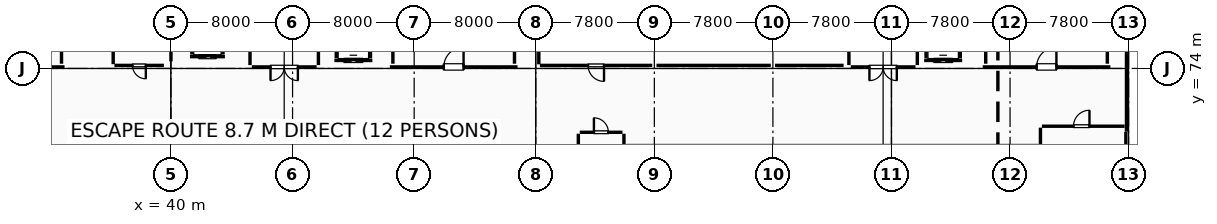
"""IFC4 building model, lengths in metres.
Left out: names, types, materials, properties, quantities, classifications, styles, units other than length and angle.
Written with IfcOpenShell. Run it as: python <this file> out.ifc"""

import sys

from ifc_helpers import new_model, si_unit, direction, frame, frame_2d, origin, origin_2d, place, context, subcontext, project, spatial, rectangle, i_section, extrude, element, fill, save


model = new_model("IFC4")
c1 = context("Model", 3, precision=1e-05, world=origin(), true_north=direction((0.0, 1.0)))
c2 = subcontext(c1, "Body", "Model", "MODEL_VIEW")
j1 = project(units=[si_unit("LENGTHUNIT", "METRE"), si_unit("PLANEANGLEUNIT", "RADIAN")], contexts=[c1])
p1 = place(None, origin())
s1 = spatial("IfcSite", under=j1, at=p1, CompositionType="ELEMENT")
p2 = place(p1, origin())
s2 = spatial("IfcBuilding", under=s1, at=p2, CompositionType="ELEMENT")
p3 = place(p2, frame((0.0, 0.0, 19.8)))
s3 = spatial("IfcBuildingStorey", under=s2, at=p3, CompositionType="ELEMENT", Elevation=19.8)
p4 = place(p3, frame((40.0, 74.0, 0.0), z_axis=(0.0, 0.0, 1.0), x_axis=(1.0, 0.0, 0.0)))
e1 = element("IfcColumn", 1, at=p4, inside=s3, PredefinedType="COLUMN", context=c2, shape_type="SweptSolid", body=[
    extrude(rectangle(XDim=0.9, YDim=0.9, at=origin_2d()), origin(), (0.0, 0.0, 1.0), 4.46),
])
for number, where, z_axis, x_axis in (
    (2, (64.0, 74.0, 0.0), (0.0, 0.0, 1.0), (1.0, 0.0, 0.0)),
    (3, (71.8, 74.0, 0.0), (0.0, 0.0, 1.0), (1.0, 0.0, 0.0)),
    (4, (79.6, 74.0, 0.0), (0.0, 0.0, 1.0), (1.0, 0.0, 0.0)),
    (5, (103.0, 74.0, 0.0), (0.0, 0.0, 1.0), (1.0, 0.0, 0.0)),
):
    element("IfcColumn", number, at=place(p3, frame(where, z_axis=z_axis, x_axis=x_axis)), inside=s3, PredefinedType="COLUMN", context=c2, shape_type="SweptSolid", body=[
        extrude(i_section(OverallWidth=0.25, OverallDepth=0.45, WebThickness=0.011, FlangeThickness=0.014, FilletRadius=0.015, at=origin_2d()), origin(), (0.0, 0.0, 1.0), 4.5),
    ])
p5 = place(p3, frame((102.86, 82.767, 0.0), z_axis=(0.0, 0.0, 1.0), x_axis=(0.0, -1.0, 0.0)))
e6 = element("IfcWall", 6, at=p5, inside=s3, PredefinedType="ELEMENTEDWALL", context=c2, shape_type="SweptSolid", body=[
    extrude(rectangle(XDim=9.0, YDim=0.24, at=frame_2d((4.5, 0.0))), origin(), (0.0, 0.0, 1.0), 3.385),
])
p6 = place(p3, frame((102.86, 73.767, 0.0), z_axis=(0.0, 0.0, 1.0), x_axis=(0.0, -1.0, 0.0)))
e7 = element("IfcWall", 7, at=p6, inside=s3, PredefinedType="ELEMENTEDWALL", context=c2, shape_type="SweptSolid", body=[
    extrude(rectangle(XDim=3.933, YDim=0.24, at=frame_2d((1.967, 0.0))), origin(), (0.0, 0.0, 1.0), 3.235),
])
p7 = place(p3, frame((102.82, 69.83, 0.0), z_axis=(0.0, 0.0, 1.0), x_axis=(0.0, -1.0, 0.0)))
e8 = element("IfcWall", 8, at=p7, inside=s3, PredefinedType="STANDARD", context=c2, shape_type="SweptSolid", body=[
    extrude(rectangle(XDim=5.063, YDim=0.32, at=frame_2d((2.531, 0.0))), origin(), (0.0, 0.0, 1.0), 3.235),
])
p8 = place(p3, frame((39.76, 69.88, 0.0), z_axis=(0.0, 0.0, 1.0), x_axis=(0.0, -1.0, 0.0)))
e9 = element("IfcWall", 9, at=p8, inside=s3, PredefinedType="PARAPET", context=c2, shape_type="SweptSolid", body=[
    extrude(rectangle(XDim=4.42, YDim=0.18, at=frame_2d((2.21, 0.0))), origin(), (0.0, 0.0, 1.0), 0.88),
])
p9 = place(p3, frame((54.4, 74.1, 0.0), z_axis=(0.0, 0.0, 1.0), x_axis=(1.0, 0.0, 0.0)))
e10 = element("IfcWall", 10, at=p9, inside=s3, PredefinedType="SHEAR", context=c2, shape_type="SweptSolid", body=[
    extrude(rectangle(XDim=8.4, YDim=0.4, at=frame_2d((4.2, 0.0))), origin(), (0.0, 0.0, 1.0), 4.25),
])
p10 = place(p9, frame((3.55, 0.0, 0.0)))
e11 = element("IfcOpeningElement", 11, at=p10, cuts=e10, PredefinedType="OPENING", context=c2, shape_type="SweptSolid", body=[
    extrude(rectangle(XDim=1.3, YDim=2.15, at=frame_2d((0.65, 1.075))), frame((0.0, 0.21, 0.0), z_axis=(0.0, -1.0, 0.0), x_axis=(1.0, 0.0, 0.0)), (0.0, 0.0, 1.0), 0.42),
])
for number, where, z_axis, x_axis in (
    (12, (62.6, 74.31, 0.0), (0.0, 0.0, 1.0), (0.0, 1.0, 0.0)),
    (13, (54.6, 82.69, 0.0), (0.0, 0.0, 1.0), (0.0, -1.0, 0.0)),
):
    element("IfcWall", number, at=place(p3, frame(where, z_axis=z_axis, x_axis=x_axis)), inside=s3, PredefinedType="SHEAR", context=c2, shape_type="SweptSolid", body=[
        extrude(rectangle(XDim=8.38, YDim=0.4, at=frame_2d((4.19, 0.0))), origin(), (0.0, 0.0, 1.0), 4.25),
    ])
p11 = place(p3, frame((50.75, 74.525, 0.0), z_axis=(0.0, 0.0, 1.0), x_axis=(1.0, 0.0, 0.0)))
e14 = element("IfcWall", 14, at=p11, inside=s3, PredefinedType="STANDARD", context=c2, shape_type="SweptSolid", body=[
    extrude(rectangle(XDim=2.5, YDim=0.25, at=frame_2d((1.25, 0.0))), origin(), (0.0, 0.0, 1.0), 4.24),
])
p12 = place(p11, frame((0.65, 0.0, 0.0)))
e15 = element("IfcOpeningElement", 15, at=p12, cuts=e14, PredefinedType="OPENING", context=c2, shape_type="SweptSolid", body=[
    extrude(rectangle(XDim=1.2, YDim=2.05, at=frame_2d((0.6, 1.025))), frame((0.0, 0.135, 0.0), z_axis=(0.0, -1.0, 0.0), x_axis=(1.0, 0.0, 0.0)), (0.0, 0.0, 1.0), 0.27),
])
for number, where, z_axis, x_axis in (
    (16, (53.125, 74.66, 0.0), (0.0, 0.0, 1.0), (0.0, 1.0, 0.0)),
    (17, (50.875, 76.94, 0.0), (0.0, 0.0, 1.0), (0.0, -1.0, 0.0)),
):
    element("IfcWall", number, at=place(p3, frame(where, z_axis=z_axis, x_axis=x_axis)), inside=s3, PredefinedType="STANDARD", context=c2, shape_type="SweptSolid", body=[
        extrude(rectangle(XDim=2.28, YDim=0.25, at=frame_2d((1.14, 0.0))), origin(), (0.0, 0.0, 1.0), 4.24),
    ])
p13 = place(p3, frame((41.25, 74.775, 0.0), z_axis=(0.0, 0.0, 1.0), x_axis=(1.0, 0.0, 0.0)))
e18 = element("IfcWall", 18, at=p13, inside=s3, PredefinedType="STANDARD", context=c2, shape_type="SweptSolid", body=[
    extrude(rectangle(XDim=2.3, YDim=0.25, at=frame_2d((1.15, 0.0))), origin(), (0.0, 0.0, 1.0), 4.24),
])
p14 = place(p13, frame((0.6, 0.0, 0.0)))
e19 = element("IfcOpeningElement", 19, at=p14, cuts=e18, PredefinedType="OPENING", context=c2, shape_type="SweptSolid", body=[
    extrude(rectangle(XDim=1.1, YDim=2.15, at=frame_2d((0.55, 1.075))), frame((0.0, 0.135, 0.0), z_axis=(0.0, -1.0, 0.0), x_axis=(1.0, 0.0, 0.0)), (0.0, 0.0, 1.0), 0.27),
])
for number, where, z_axis, x_axis in (
    (20, (43.425, 74.91, 0.0), (0.0, 0.0, 1.0), (0.0, 1.0, 0.0)),
    (21, (41.375, 77.49, 0.0), (0.0, 0.0, 1.0), (0.0, -1.0, 0.0)),
):
    element("IfcWall", number, at=place(p3, frame(where, z_axis=z_axis, x_axis=x_axis)), inside=s3, PredefinedType="STANDARD", context=c2, shape_type="SweptSolid", body=[
        extrude(rectangle(XDim=2.58, YDim=0.25, at=frame_2d((1.29, 0.0))), origin(), (0.0, 0.0, 1.0), 4.24),
    ])
p15 = place(p3, frame((93.4, 74.1, 0.0), z_axis=(0.0, 0.0, 1.0), x_axis=(1.0, 0.0, 0.0)))
e22 = element("IfcWall", 22, at=p15, inside=s3, PredefinedType="SHEAR", context=c2, shape_type="SweptSolid", body=[
    extrude(rectangle(XDim=8.4, YDim=0.4, at=frame_2d((4.2, 0.0))), origin(), (0.0, 0.0, 1.0), 4.25),
])
p16 = place(p15, frame((3.55, 0.0, 0.0)))
e23 = element("IfcOpeningElement", 23, at=p16, cuts=e22, PredefinedType="OPENING", context=c2, shape_type="SweptSolid", body=[
    extrude(rectangle(XDim=1.3, YDim=2.15, at=frame_2d((0.65, 1.075))), frame((0.0, 0.21, 0.0), z_axis=(0.0, -1.0, 0.0), x_axis=(1.0, 0.0, 0.0)), (0.0, 0.0, 1.0), 0.42),
])
for number, where, z_axis, x_axis in (
    (24, (101.6, 74.31, 0.0), (0.0, 0.0, 1.0), (0.0, 1.0, 0.0)),
    (25, (93.6, 82.69, 0.0), (0.0, 0.0, 1.0), (0.0, -1.0, 0.0)),
):
    element("IfcWall", number, at=place(p3, frame(where, z_axis=z_axis, x_axis=x_axis)), inside=s3, PredefinedType="SHEAR", context=c2, shape_type="SweptSolid", body=[
        extrude(rectangle(XDim=8.38, YDim=0.4, at=frame_2d((4.19, 0.0))), origin(), (0.0, 0.0, 1.0), 4.25),
    ])
p17 = place(p3, frame((89.55, 74.525, 0.0), z_axis=(0.0, 0.0, 1.0), x_axis=(1.0, 0.0, 0.0)))
e26 = element("IfcWall", 26, at=p17, inside=s3, PredefinedType="STANDARD", context=c2, shape_type="SweptSolid", body=[
    extrude(rectangle(XDim=2.5, YDim=0.25, at=frame_2d((1.25, 0.0))), origin(), (0.0, 0.0, 1.0), 4.24),
])
p18 = place(p17, frame((0.65, 0.0, 0.0)))
e27 = element("IfcOpeningElement", 27, at=p18, cuts=e26, PredefinedType="OPENING", context=c2, shape_type="SweptSolid", body=[
    extrude(rectangle(XDim=1.2, YDim=2.05, at=frame_2d((0.6, 1.025))), frame((0.0, 0.135, 0.0), z_axis=(0.0, -1.0, 0.0), x_axis=(1.0, 0.0, 0.0)), (0.0, 0.0, 1.0), 0.27),
])
for number, where, z_axis, x_axis in (
    (28, (91.925, 74.66, 0.0), (0.0, 0.0, 1.0), (0.0, 1.0, 0.0)),
    (29, (89.675, 76.94, 0.0), (0.0, 0.0, 1.0), (0.0, -1.0, 0.0)),
):
    element("IfcWall", number, at=place(p3, frame(where, z_axis=z_axis, x_axis=x_axis)), inside=s3, PredefinedType="STANDARD", context=c2, shape_type="SweptSolid", body=[
        extrude(rectangle(XDim=2.28, YDim=0.25, at=frame_2d((1.14, 0.0))), origin(), (0.0, 0.0, 1.0), 4.24),
    ])
p19 = place(p3, frame((24.374, 74.1, 0.0), z_axis=(0.0, 0.0, 1.0), x_axis=(1.0, 0.0, 0.0)))
e30 = element("IfcWall", 30, at=p19, inside=s3, PredefinedType="SHEAR", context=c2, shape_type="SweptSolid", body=[
    extrude(rectangle(XDim=8.626, YDim=0.4, at=frame_2d((4.313, 0.0))), origin(), (0.0, 0.0, 1.0), 4.25),
])
p20 = place(p19, frame((3.776, 0.0, 0.0)))
e31 = element("IfcOpeningElement", 31, at=p20, cuts=e30, PredefinedType="OPENING", context=c2, shape_type="SweptSolid", body=[
    extrude(rectangle(XDim=1.3, YDim=2.15, at=frame_2d((0.65, 1.075))), frame((0.0, 0.21, 0.0), z_axis=(0.0, -1.0, 0.0), x_axis=(1.0, 0.0, 0.0)), (0.0, 0.0, 1.0), 0.42),
])
p21 = place(p3, frame((32.8, 74.31, 0.0), z_axis=(0.0, 0.0, 1.0), x_axis=(0.0, 1.0, 0.0)))
e32 = element("IfcWall", 32, at=p21, inside=s3, PredefinedType="SHEAR", context=c2, shape_type="SweptSolid", body=[
    extrude(rectangle(XDim=8.38, YDim=0.4, at=frame_2d((4.19, 0.0))), origin(), (0.0, 0.0, 1.0), 4.25),
])
for number, where, z_axis, x_axis in (
    (33, (45.2, 74.22, 0.0), (0.0, 0.0, 1.0), (0.0, 1.0, 0.0)),
    (34, (49.7, 77.58, 0.0), (0.0, 0.0, 1.0), (0.0, -1.0, 0.0)),
):
    element("IfcWall", number, at=place(p3, frame(where, z_axis=z_axis, x_axis=x_axis)), inside=s3, PredefinedType="PARTITIONING", context=c2, shape_type="SweptSolid", body=[
        extrude(rectangle(XDim=3.36, YDim=0.2, at=frame_2d((1.68, 0.0))), origin(), (0.0, 0.0, 1.0), 4.24),
    ])
p22 = place(p3, frame((49.58, 74.1, 0.0), z_axis=(0.0, 0.0, 1.0), x_axis=(-1.0, 0.0, 0.0)))
e35 = element("IfcWall", 35, at=p22, inside=s3, PredefinedType="PARTITIONING", context=c2, shape_type="SweptSolid", body=[
    extrude(rectangle(XDim=4.26, YDim=0.2, at=frame_2d((2.13, 0.0))), origin(), (0.0, 0.0, 1.0), 4.24),
])
p23 = place(p22, frame((1.23, 0.0, 0.0)))
e36 = element("IfcOpeningElement", 36, at=p23, cuts=e35, PredefinedType="OPENING", context=c2, shape_type="SweptSolid", body=[
    extrude(rectangle(XDim=1.8, YDim=2.15, at=frame_2d((0.9, 1.075))), frame((0.0, 0.11, 0.0), z_axis=(0.0, -1.0, 0.0), x_axis=(1.0, 0.0, 0.0)), (0.0, 0.0, 1.0), 0.22),
])
for number, where, z_axis, x_axis in (
    (37, (84.6, 74.22, 0.0), (0.0, 0.0, 1.0), (0.0, 1.0, 0.0)),
    (38, (89.1, 77.58, 0.0), (0.0, 0.0, 1.0), (0.0, -1.0, 0.0)),
):
    element("IfcWall", number, at=place(p3, frame(where, z_axis=z_axis, x_axis=x_axis)), inside=s3, PredefinedType="PARTITIONING", context=c2, shape_type="SweptSolid", body=[
        extrude(rectangle(XDim=3.36, YDim=0.2, at=frame_2d((1.68, 0.0))), origin(), (0.0, 0.0, 1.0), 4.24),
    ])
p24 = place(p3, frame((88.98, 74.1, 0.0), z_axis=(0.0, 0.0, 1.0), x_axis=(-1.0, 0.0, 0.0)))
e39 = element("IfcWall", 39, at=p24, inside=s3, PredefinedType="PARTITIONING", context=c2, shape_type="SweptSolid", body=[
    extrude(rectangle(XDim=4.26, YDim=0.2, at=frame_2d((2.13, 0.0))), origin(), (0.0, 0.0, 1.0), 4.24),
])
p25 = place(p24, frame((1.23, 0.0, 0.0)))
e40 = element("IfcOpeningElement", 40, at=p25, cuts=e39, PredefinedType="OPENING", context=c2, shape_type="SweptSolid", body=[
    extrude(rectangle(XDim=1.8, YDim=2.15, at=frame_2d((0.9, 1.075))), frame((0.0, 0.11, 0.0), z_axis=(0.0, -1.0, 0.0), x_axis=(1.0, 0.0, 0.0)), (0.0, 0.0, 1.0), 0.22),
])
p26 = place(p3, frame((64.2, 74.27, 0.0), z_axis=(0.0, 0.0, 1.0), x_axis=(0.0, 1.0, 0.0)))
e41 = element("IfcWall", 41, at=p26, inside=s3, PredefinedType="PARTITIONING", context=c2, shape_type="SweptSolid", body=[
    extrude(rectangle(XDim=8.501, YDim=0.1, at=frame_2d((4.25, 0.0))), origin(), (0.0, 0.0, 1.0), 3.48),
])
p27 = place(p26, frame((3.605, 0.0, 0.0)))
e42 = element("IfcOpeningElement", 42, at=p27, cuts=e41, PredefinedType="OPENING", context=c2, shape_type="SweptSolid", body=[
    extrude(rectangle(XDim=1.05, YDim=2.15, at=frame_2d((0.525, 1.075))), frame((0.0, 0.06, 0.0), z_axis=(0.0, -1.0, 0.0), x_axis=(1.0, 0.0, 0.0)), (0.0, 0.0, 1.0), 0.12),
])
p28 = place(p3, frame((84.25, 74.2, 0.0), z_axis=(0.0, 0.0, 1.0), x_axis=(-1.0, 0.0, 0.0)))
e43 = element("IfcWall", 43, at=p28, inside=s3, PredefinedType="PARTITIONING", context=c2, shape_type="SweptSolid", body=[
    extrude(rectangle(XDim=4.51, YDim=0.1, at=frame_2d((2.255, 0.0))), origin(), (0.0, 0.0, 1.0), 4.24),
])
p29 = place(p3, frame((79.46, 74.2, 0.0), z_axis=(0.0, 0.0, 1.0), x_axis=(-1.0, 0.0, 0.0)))
e44 = element("IfcWall", 44, at=p29, inside=s3, PredefinedType="PARTITIONING", context=c2, shape_type="SweptSolid", body=[
    extrude(rectangle(XDim=7.52, YDim=0.1, at=frame_2d((3.76, 0.0))), origin(), (0.0, 0.0, 1.0), 3.23),
])
p30 = place(p3, frame((71.66, 74.2, 0.0), z_axis=(0.0, 0.0, 1.0), x_axis=(-1.0, 0.0, 0.0)))
e45 = element("IfcWall", 45, at=p30, inside=s3, PredefinedType="PARTITIONING", context=c2, shape_type="SweptSolid", body=[
    extrude(rectangle(XDim=7.39, YDim=0.1, at=frame_2d((3.695, 0.0))), origin(), (0.0, 0.0, 1.0), 3.78),
])
p31 = place(p30, frame((3.17, 0.0, 0.0)))
e46 = element("IfcOpeningElement", 46, at=p31, cuts=e45, PredefinedType="OPENING", context=c2, shape_type="SweptSolid", body=[
    extrude(rectangle(XDim=1.05, YDim=2.15, at=frame_2d((0.525, 1.075))), frame((0.0, 0.06, 0.0), z_axis=(0.0, -1.0, 0.0), x_axis=(1.0, 0.0, 0.0)), (0.0, 0.0, 1.0), 0.12),
])
p32 = place(p3, frame((97.295, 70.2, 0.0), z_axis=(0.0, 0.0, 1.0), x_axis=(1.0, 0.0, 0.0)))
e47 = element("IfcWall", 47, at=p32, inside=s3, PredefinedType="PARTITIONING", context=c2, shape_type="SweptSolid", body=[
    extrude(rectangle(XDim=5.441, YDim=0.15, at=frame_2d((2.721, 0.0))), origin(), (0.0, 0.0, 1.0), 4.24),
])
p33 = place(p32, frame((2.08, 0.0, 0.0)))
e48 = element("IfcOpeningElement", 48, at=p33, cuts=e47, PredefinedType="OPENING", context=c2, shape_type="SweptSolid", body=[
    extrude(rectangle(XDim=1.05, YDim=2.15, at=frame_2d((0.525, 1.075))), frame((0.0, 0.085, 0.0), z_axis=(0.0, -1.0, 0.0), x_axis=(1.0, 0.0, 0.0)), (0.0, 0.0, 1.0), 0.17),
])
p34 = place(p3, frame((97.2, 47.495, 0.0), z_axis=(0.0, 0.0, 1.0), x_axis=(0.0, 1.0, 0.0)))
e49 = element("IfcWall", 49, at=p34, inside=s3, PredefinedType="PARTITIONING", context=c2, shape_type="SweptSolid", body=[
    extrude(rectangle(XDim=22.61, YDim=0.15, at=frame_2d((11.305, 0.0))), origin(), (0.0, 0.0, 1.0), 4.24),
])
p35 = place(p3, frame((66.895, 69.8, 0.0), z_axis=(0.0, 0.0, 1.0), x_axis=(1.0, 0.0, 0.0)))
e50 = element("IfcWall", 50, at=p35, inside=s3, PredefinedType="PARTITIONING", context=c2, shape_type="SweptSolid", body=[
    extrude(rectangle(XDim=2.81, YDim=0.15, at=frame_2d((1.405, 0.0))), origin(), (0.0, 0.0, 1.0), 4.24),
])
p36 = place(p35, frame((0.93, 0.0, 0.0)))
e51 = element("IfcOpeningElement", 51, at=p36, cuts=e50, PredefinedType="OPENING", context=c2, shape_type="SweptSolid", body=[
    extrude(rectangle(XDim=0.95, YDim=2.15, at=frame_2d((0.475, 1.075))), frame((0.0, 0.085, 0.0), z_axis=(0.0, -1.0, 0.0), x_axis=(1.0, 0.0, 0.0)), (0.0, 0.0, 1.0), 0.17),
])
p37 = place(p3, frame((69.8, 69.705, 0.0), z_axis=(0.0, 0.0, 1.0), x_axis=(0.0, -1.0, 0.0)))
e52 = element("IfcWall", 52, at=p37, inside=s3, PredefinedType="PARTITIONING", context=c2, shape_type="SweptSolid", body=[
    extrude(rectangle(XDim=20.41, YDim=0.15, at=frame_2d((10.205, 0.0))), origin(), (0.0, 0.0, 1.0), 4.24),
])
p38 = place(p3, frame((66.8, 49.295, 0.0), z_axis=(0.0, 0.0, 1.0), x_axis=(0.0, 1.0, 0.0)))
e53 = element("IfcWall", 53, at=p38, inside=s3, PredefinedType="PARTITIONING", context=c2, shape_type="SweptSolid", body=[
    extrude(rectangle(XDim=20.41, YDim=0.15, at=frame_2d((10.205, 0.0))), origin(), (0.0, 0.0, 1.0), 3.83),
])
p39 = place(p3, frame((40.0, 81.92, 0.0), z_axis=(0.0, 0.0, 1.0), x_axis=(0.0, -1.0, 0.0)))
e54 = element("IfcWall", 54, at=p39, inside=s3, PredefinedType="PARTITIONING", context=c2, shape_type="SweptSolid", body=[
    extrude(rectangle(XDim=7.455, YDim=0.12, at=frame_2d((3.728, 0.0))), origin(), (0.0, 0.0, 1.0), 3.88),
])
p40 = place(p3, frame((39.535, 74.2, 0.0), z_axis=(0.0, 0.0, 1.0), x_axis=(-1.0, 0.0, 0.0)))
e55 = element("IfcWall", 55, at=p40, inside=s3, PredefinedType="PARTITIONING", context=c2, shape_type="SweptSolid", body=[
    extrude(rectangle(XDim=3.255, YDim=0.12, at=frame_2d((1.627, 0.0))), origin(), (0.0, 0.0, 1.0), 4.24),
])
p41 = place(p40, frame((1.187, 0.0, 0.0)))
e56 = element("IfcOpeningElement", 56, at=p41, cuts=e55, PredefinedType="OPENING", context=c2, shape_type="SweptSolid", body=[
    extrude(rectangle(XDim=0.88, YDim=2.1, at=frame_2d((0.44, 1.05))), frame((0.0, 0.07, 0.0), z_axis=(0.0, -1.0, 0.0), x_axis=(1.0, 0.0, 0.0)), (0.0, 0.0, 1.0), 0.14),
])
p42 = place(p3, frame((36.2, 74.28, 0.0), z_axis=(0.0, 0.0, 1.0), x_axis=(0.0, 1.0, 0.0)))
e57 = element("IfcWall", 57, at=p42, inside=s3, PredefinedType="PARTITIONING", context=c2, shape_type="SweptSolid", body=[
    extrude(rectangle(XDim=7.64, YDim=0.12, at=frame_2d((3.82, 0.0))), origin(), (0.0, 0.0, 1.0), 4.24),
])
p43 = place(p10, origin())
e58 = element("IfcDoor", 58, at=p43, inside=s3, OperationType="SINGLE_SWING_RIGHT", PredefinedType="DOOR", context=c2, shape_type="SweptSolid", body=[
    extrude(rectangle(XDim=1.3, YDim=2.15, at=frame_2d((0.65, 1.075))), frame((0.0, 0.025, 0.0), z_axis=(0.0, -1.0, 0.0), x_axis=(1.0, 0.0, 0.0)), (0.0, 0.0, 1.0), 0.05),
])
fill(e11, e58)
p44 = place(p12, origin())
e59 = element("IfcDoor", 59, at=p44, inside=s3, OperationType="DOUBLE_DOOR_SLIDING", PredefinedType="DOOR", context=c2, shape_type="SweptSolid", body=[
    extrude(rectangle(XDim=1.2, YDim=2.05, at=frame_2d((0.6, 1.025))), frame((0.0, 0.025, 0.0), z_axis=(0.0, -1.0, 0.0), x_axis=(1.0, 0.0, 0.0)), (0.0, 0.0, 1.0), 0.05),
])
fill(e15, e59)
p45 = place(p14, origin())
e60 = element("IfcDoor", 60, at=p45, inside=s3, OperationType="DOUBLE_DOOR_SLIDING", PredefinedType="DOOR", context=c2, shape_type="SweptSolid", body=[
    extrude(rectangle(XDim=1.1, YDim=2.15, at=frame_2d((0.55, 1.075))), frame((0.0, 0.025, 0.0), z_axis=(0.0, -1.0, 0.0), x_axis=(1.0, 0.0, 0.0)), (0.0, 0.0, 1.0), 0.05),
])
fill(e19, e60)
p46 = place(p16, origin())
e61 = element("IfcDoor", 61, at=p46, inside=s3, OperationType="SINGLE_SWING_RIGHT", PredefinedType="DOOR", context=c2, shape_type="SweptSolid", body=[
    extrude(rectangle(XDim=1.3, YDim=2.15, at=frame_2d((0.65, 1.075))), frame((0.0, 0.025, 0.0), z_axis=(0.0, -1.0, 0.0), x_axis=(1.0, 0.0, 0.0)), (0.0, 0.0, 1.0), 0.05),
])
fill(e23, e61)
p47 = place(p18, origin())
e62 = element("IfcDoor", 62, at=p47, inside=s3, OperationType="DOUBLE_DOOR_SLIDING", PredefinedType="DOOR", context=c2, shape_type="SweptSolid", body=[
    extrude(rectangle(XDim=1.2, YDim=2.05, at=frame_2d((0.6, 1.025))), frame((0.0, 0.025, 0.0), z_axis=(0.0, -1.0, 0.0), x_axis=(1.0, 0.0, 0.0)), (0.0, 0.0, 1.0), 0.05),
])
fill(e27, e62)
p48 = place(p23, origin())
e63 = element("IfcDoor", 63, at=p48, inside=s3, OperationType="DOUBLE_DOOR_SINGLE_SWING", PredefinedType="DOOR", context=c2, shape_type="SweptSolid", body=[
    extrude(rectangle(XDim=1.8, YDim=2.15, at=frame_2d((0.9, 1.075))), frame((0.0, 0.025, 0.0), z_axis=(0.0, -1.0, 0.0), x_axis=(1.0, 0.0, 0.0)), (0.0, 0.0, 1.0), 0.05),
])
fill(e36, e63)
p49 = place(p25, origin())
e64 = element("IfcDoor", 64, at=p49, inside=s3, OperationType="DOUBLE_DOOR_SINGLE_SWING", PredefinedType="DOOR", context=c2, shape_type="SweptSolid", body=[
    extrude(rectangle(XDim=1.8, YDim=2.15, at=frame_2d((0.9, 1.075))), frame((0.0, 0.025, 0.0), z_axis=(0.0, -1.0, 0.0), x_axis=(1.0, 0.0, 0.0)), (0.0, 0.0, 1.0), 0.05),
])
fill(e40, e64)
p50 = place(p31, origin())
e65 = element("IfcDoor", 65, at=p50, inside=s3, OperationType="SINGLE_SWING_LEFT", PredefinedType="DOOR", context=c2, shape_type="SweptSolid", body=[
    extrude(rectangle(XDim=1.05, YDim=2.15, at=frame_2d((0.525, 1.075))), frame((0.0, 0.025, 0.0), z_axis=(0.0, -1.0, 0.0), x_axis=(1.0, 0.0, 0.0)), (0.0, 0.0, 1.0), 0.05),
])
fill(e46, e65)
p51 = place(p33, origin())
e66 = element("IfcDoor", 66, at=p51, inside=s3, OperationType="SINGLE_SWING_RIGHT", PredefinedType="DOOR", context=c2, shape_type="SweptSolid", body=[
    extrude(rectangle(XDim=1.05, YDim=2.15, at=frame_2d((0.525, 1.075))), frame((0.0, 0.025, 0.0), z_axis=(0.0, -1.0, 0.0), x_axis=(1.0, 0.0, 0.0)), (0.0, 0.0, 1.0), 0.05),
])
fill(e48, e66)
p52 = place(p36, origin())
e67 = element("IfcDoor", 67, at=p52, inside=s3, OperationType="SINGLE_SWING_LEFT", PredefinedType="DOOR", context=c2, shape_type="SweptSolid", body=[
    extrude(rectangle(XDim=0.95, YDim=2.15, at=frame_2d((0.475, 1.075))), frame((0.0, 0.025, 0.0), z_axis=(0.0, -1.0, 0.0), x_axis=(1.0, 0.0, 0.0)), (0.0, 0.0, 1.0), 0.05),
])
fill(e51, e67)
p53 = place(p41, origin())
e68 = element("IfcDoor", 68, at=p53, inside=s3, OperationType="SINGLE_SWING_LEFT", PredefinedType="DOOR", context=c2, shape_type="SweptSolid", body=[
    extrude(rectangle(XDim=0.88, YDim=2.1, at=frame_2d((0.44, 1.05))), frame((0.0, 0.025, 0.0), z_axis=(0.0, -1.0, 0.0), x_axis=(1.0, 0.0, 0.0)), (0.0, 0.0, 1.0), 0.05),
])
fill(e56, e68)
save(model, sys.argv[1])
